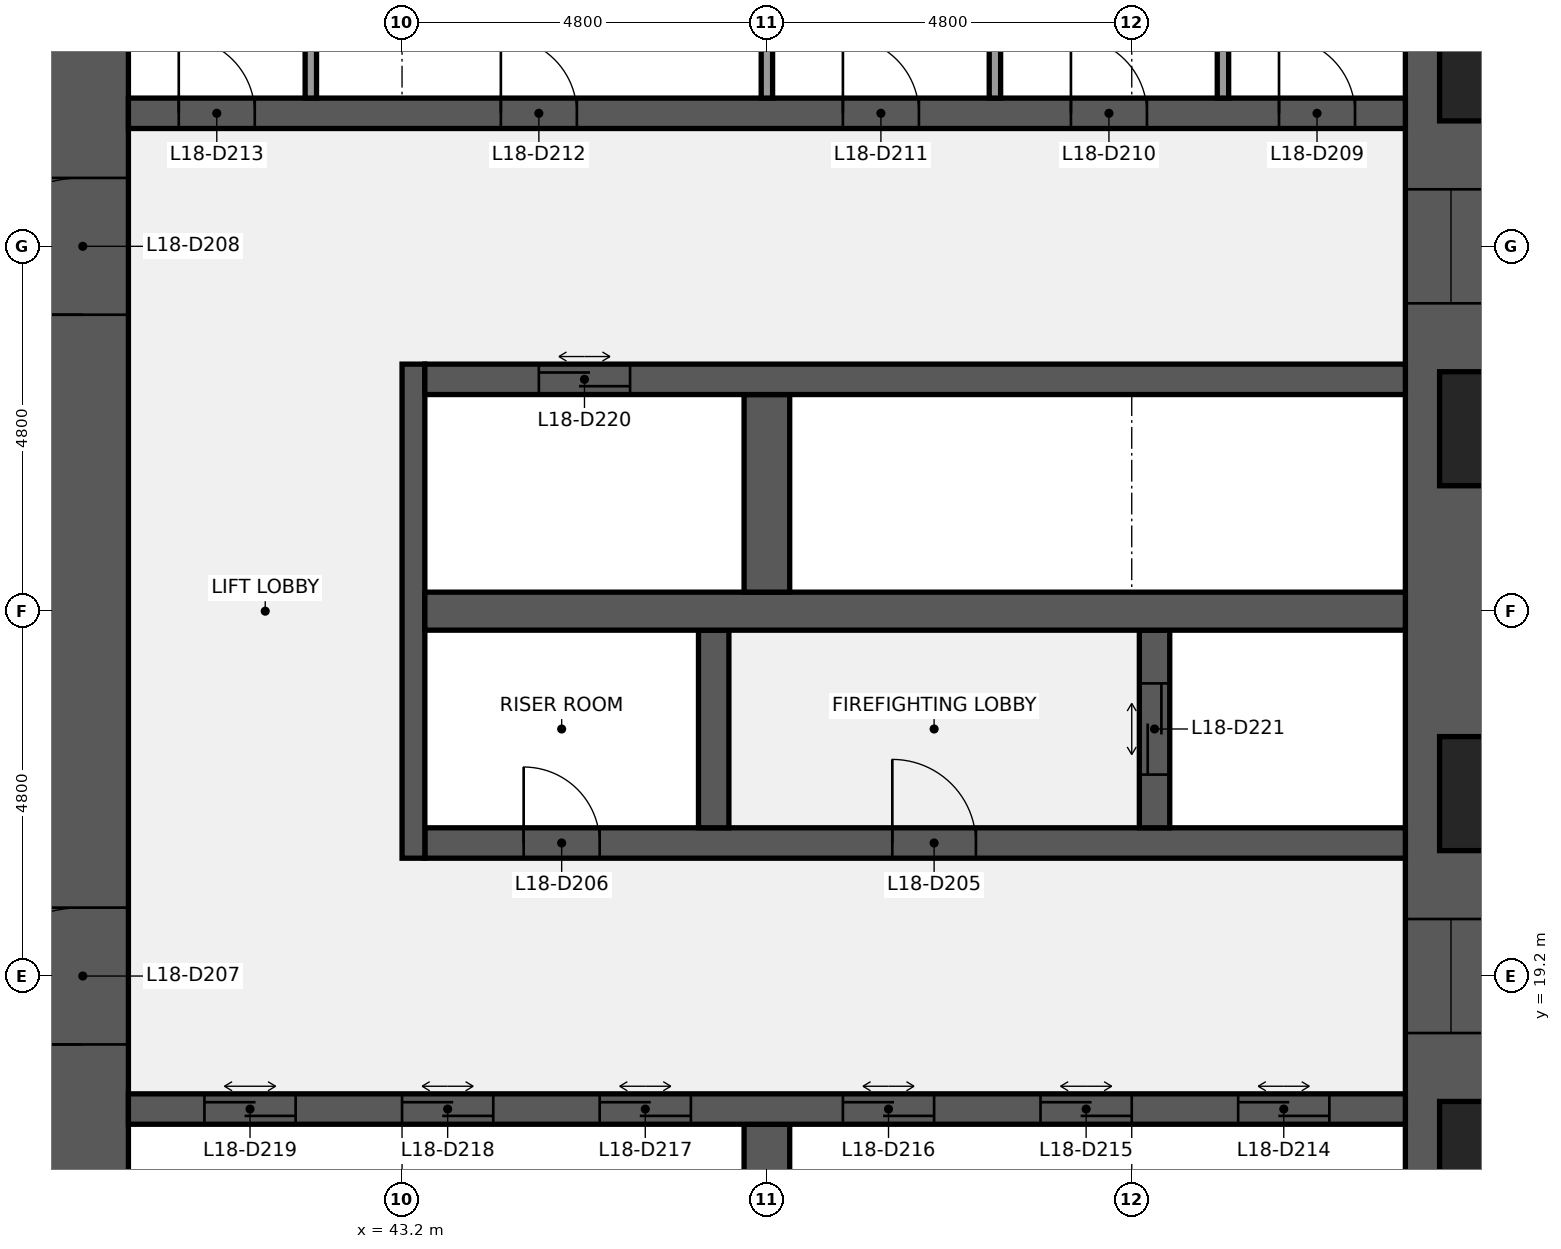
"""IFC4 building model, lengths in metres.
Left out: names, types, materials, properties, quantities, classifications, styles, units other than length and angle.
Written with IfcOpenShell. Run it as: python <this file> out.ifc"""

import sys

from ifc_helpers import new_model, si_unit, direction, frame, frame_2d, origin, place, context, subcontext, project, spatial, rectangle, extrude, element, fill, save


model = new_model("IFC4")
c1 = context("Model", 3, precision=1e-05, world=origin(), true_north=direction((0.0, 1.0)))
c2 = subcontext(c1, "Body", "Model", "MODEL_VIEW")
j1 = project(units=[si_unit("LENGTHUNIT", "METRE"), si_unit("PLANEANGLEUNIT", "RADIAN")], contexts=[c1])
p1 = place(None, origin())
s1 = spatial("IfcSite", under=j1, at=p1, CompositionType="ELEMENT")
p2 = place(p1, origin())
s2 = spatial("IfcBuilding", under=s1, at=p2, CompositionType="ELEMENT")
p3 = place(p2, frame((0.0, 0.0, 83.0)))
s3 = spatial("IfcBuildingStorey", under=s2, at=p3, CompositionType="ELEMENT", Elevation=83.0)
p4 = place(p3, frame((57.0, 38.4, 0.0), z_axis=(0.0, 0.0, 1.0), x_axis=(0.0, -1.0, 0.0)))
e1 = element("IfcWall", 1, at=p4, inside=s3, PredefinedType="SHEAR", context=c2, shape_type="SweptSolid", body=[
    extrude(rectangle(XDim=28.8, YDim=1.2, at=frame_2d((14.4, 0.0))), origin(), (0.0, 0.0, 1.0), 3.7),
])
p5 = place(p4, frame((18.45, 0.0, 0.9)))
e2 = element("IfcOpeningElement", 2, at=p5, cuts=e1, PredefinedType="OPENING", context=c2, shape_type="SweptSolid", body=[
    extrude(rectangle(XDim=1.5, YDim=1.5, at=frame_2d((0.75, 0.75))), frame((0.0, 0.61, 0.0), z_axis=(0.0, -1.0, 0.0), x_axis=(1.0, 0.0, 0.0)), (0.0, 0.0, 1.0), 1.22),
])
p6 = place(p4, frame((8.85, 0.0, 0.9)))
e3 = element("IfcOpeningElement", 3, at=p6, cuts=e1, PredefinedType="OPENING", context=c2, shape_type="SweptSolid", body=[
    extrude(rectangle(XDim=1.5, YDim=1.5, at=frame_2d((0.75, 0.75))), frame((0.0, 0.61, 0.0), z_axis=(0.0, -1.0, 0.0), x_axis=(1.0, 0.0, 0.0)), (0.0, 0.0, 1.0), 1.22),
])
p7 = place(p3, frame((39.0, 9.6, 0.0), z_axis=(0.0, 0.0, 1.0), x_axis=(0.0, 1.0, 0.0)))
e4 = element("IfcWall", 4, at=p7, inside=s3, PredefinedType="SHEAR", context=c2, shape_type="SweptSolid", body=[
    extrude(rectangle(XDim=28.8, YDim=1.2, at=frame_2d((14.4, 0.0))), origin(), (0.0, 0.0, 1.0), 3.7),
])
p8 = place(p7, frame((8.7, 0.0, 0.0)))
e5 = element("IfcOpeningElement", 5, at=p8, cuts=e4, PredefinedType="OPENING", context=c2, shape_type="SweptSolid", body=[
    extrude(rectangle(XDim=1.8, YDim=2.1, at=frame_2d((0.9, 1.05))), frame((0.0, 0.61, 0.0), z_axis=(0.0, -1.0, 0.0), x_axis=(1.0, 0.0, 0.0)), (0.0, 0.0, 1.0), 1.22),
])
p9 = place(p7, frame((18.3, 0.0, 0.0)))
e6 = element("IfcOpeningElement", 6, at=p9, cuts=e4, PredefinedType="OPENING", context=c2, shape_type="SweptSolid", body=[
    extrude(rectangle(XDim=1.8, YDim=2.1, at=frame_2d((0.9, 1.05))), frame((0.0, 0.61, 0.0), z_axis=(0.0, -1.0, 0.0), x_axis=(1.0, 0.0, 0.0)), (0.0, 0.0, 1.0), 1.22),
])
p10 = place(p3, frame((48.0, 14.65, 0.0), z_axis=(0.0, 0.0, 1.0), x_axis=(0.0, 1.0, 0.0)))
e7 = element("IfcWall", 7, at=p10, inside=s3, PredefinedType="SHEAR", context=c2, shape_type="SweptSolid", body=[
    extrude(rectangle(XDim=2.6, YDim=0.6, at=frame_2d((1.3, 0.0))), origin(), (0.0, 0.0, 1.0), 3.7),
])
p11 = place(p3, frame((39.6, 17.45, 0.0), z_axis=(0.0, 0.0, 1.0), x_axis=(1.0, 0.0, 0.0)))
e8 = element("IfcWall", 8, at=p11, inside=s3, PredefinedType="SHEAR", context=c2, shape_type="SweptSolid", body=[
    extrude(rectangle(XDim=16.8, YDim=0.4, at=frame_2d((8.4, 0.0))), origin(), (0.0, 0.0, 1.0), 3.7),
])
p12 = place(p11, frame((14.6, 0.0, 0.0)))
e9 = element("IfcOpeningElement", 9, at=p12, cuts=e8, PredefinedType="OPENING", context=c2, shape_type="SweptSolid", body=[
    extrude(rectangle(XDim=1.2, YDim=2.1, at=frame_2d((0.6, 1.05))), frame((0.0, 0.21, 0.0), z_axis=(0.0, -1.0, 0.0), x_axis=(1.0, 0.0, 0.0)), (0.0, 0.0, 1.0), 0.42),
])
p13 = place(p11, frame((12.0, 0.0, 0.0)))
e10 = element("IfcOpeningElement", 10, at=p13, cuts=e8, PredefinedType="OPENING", context=c2, shape_type="SweptSolid", body=[
    extrude(rectangle(XDim=1.2, YDim=2.1, at=frame_2d((0.6, 1.05))), frame((0.0, 0.21, 0.0), z_axis=(0.0, -1.0, 0.0), x_axis=(1.0, 0.0, 0.0)), (0.0, 0.0, 1.0), 0.42),
])
p14 = place(p11, frame((9.4, 0.0, 0.0)))
e11 = element("IfcOpeningElement", 11, at=p14, cuts=e8, PredefinedType="OPENING", context=c2, shape_type="SweptSolid", body=[
    extrude(rectangle(XDim=1.2, YDim=2.1, at=frame_2d((0.6, 1.05))), frame((0.0, 0.21, 0.0), z_axis=(0.0, -1.0, 0.0), x_axis=(1.0, 0.0, 0.0)), (0.0, 0.0, 1.0), 0.42),
])
p15 = place(p11, frame((6.2, 0.0, 0.0)))
e12 = element("IfcOpeningElement", 12, at=p15, cuts=e8, PredefinedType="OPENING", context=c2, shape_type="SweptSolid", body=[
    extrude(rectangle(XDim=1.2, YDim=2.1, at=frame_2d((0.6, 1.05))), frame((0.0, 0.21, 0.0), z_axis=(0.0, -1.0, 0.0), x_axis=(1.0, 0.0, 0.0)), (0.0, 0.0, 1.0), 0.42),
])
p16 = place(p11, frame((3.6, 0.0, 0.0)))
e13 = element("IfcOpeningElement", 13, at=p16, cuts=e8, PredefinedType="OPENING", context=c2, shape_type="SweptSolid", body=[
    extrude(rectangle(XDim=1.2, YDim=2.1, at=frame_2d((0.6, 1.05))), frame((0.0, 0.21, 0.0), z_axis=(0.0, -1.0, 0.0), x_axis=(1.0, 0.0, 0.0)), (0.0, 0.0, 1.0), 0.42),
])
p17 = place(p11, frame((1.0, 0.0, 0.0)))
e14 = element("IfcOpeningElement", 14, at=p17, cuts=e8, PredefinedType="OPENING", context=c2, shape_type="SweptSolid", body=[
    extrude(rectangle(XDim=1.2, YDim=2.1, at=frame_2d((0.6, 1.05))), frame((0.0, 0.21, 0.0), z_axis=(0.0, -1.0, 0.0), x_axis=(1.0, 0.0, 0.0)), (0.0, 0.0, 1.0), 0.42),
])
p18 = place(p3, frame((43.5, 20.95, 0.0), z_axis=(0.0, 0.0, 1.0), x_axis=(1.0, 0.0, 0.0)))
e15 = element("IfcWall", 15, at=p18, inside=s3, PredefinedType="SHEAR", context=c2, shape_type="SweptSolid", body=[
    extrude(rectangle(XDim=12.9, YDim=0.4, at=frame_2d((6.45, 0.0))), origin(), (0.0, 0.0, 1.0), 3.7),
])
p19 = place(p18, frame((6.15, 0.0, 0.0)))
e16 = element("IfcOpeningElement", 16, at=p19, cuts=e15, PredefinedType="OPENING", context=c2, shape_type="SweptSolid", body=[
    extrude(rectangle(XDim=1.1, YDim=2.1, at=frame_2d((0.55, 1.05))), frame((0.0, 0.21, 0.0), z_axis=(0.0, -1.0, 0.0), x_axis=(1.0, 0.0, 0.0)), (0.0, 0.0, 1.0), 0.42),
])
p20 = place(p18, frame((1.3, 0.0, 0.0)))
e17 = element("IfcOpeningElement", 17, at=p20, cuts=e15, PredefinedType="OPENING", context=c2, shape_type="SweptSolid", body=[
    extrude(rectangle(XDim=1.0, YDim=2.1, at=frame_2d((0.5, 1.05))), frame((0.0, 0.21, 0.0), z_axis=(0.0, -1.0, 0.0), x_axis=(1.0, 0.0, 0.0)), (0.0, 0.0, 1.0), 0.42),
])
p21 = place(p3, frame((43.35, 20.75, 0.0), z_axis=(0.0, 0.0, 1.0), x_axis=(0.0, 1.0, 0.0)))
e18 = element("IfcWall", 18, at=p21, inside=s3, PredefinedType="SHEAR", context=c2, shape_type="SweptSolid", body=[
    extrude(rectangle(XDim=6.5, YDim=0.3, at=frame_2d((3.25, 0.0))), origin(), (0.0, 0.0, 1.0), 3.7),
])
p22 = place(p3, frame((53.1, 21.15, 0.0), z_axis=(0.0, 0.0, 1.0), x_axis=(0.0, 1.0, 0.0)))
e19 = element("IfcWall", 19, at=p22, inside=s3, PredefinedType="SHEAR", context=c2, shape_type="SweptSolid", body=[
    extrude(rectangle(XDim=2.6, YDim=0.4, at=frame_2d((1.3, 0.0))), origin(), (0.0, 0.0, 1.0), 3.7),
])
p23 = place(p22, frame((0.7, 0.0, 0.0)))
e20 = element("IfcOpeningElement", 20, at=p23, cuts=e19, PredefinedType="OPENING", context=c2, shape_type="SweptSolid", body=[
    extrude(rectangle(XDim=1.2, YDim=2.1, at=frame_2d((0.6, 1.05))), frame((0.0, 0.21, 0.0), z_axis=(0.0, -1.0, 0.0), x_axis=(1.0, 0.0, 0.0)), (0.0, 0.0, 1.0), 0.42),
])
p24 = place(p3, frame((47.3, 21.15, 0.0), z_axis=(0.0, 0.0, 1.0), x_axis=(0.0, 1.0, 0.0)))
e21 = element("IfcWall", 21, at=p24, inside=s3, PredefinedType="SHEAR", context=c2, shape_type="SweptSolid", body=[
    extrude(rectangle(XDim=2.6, YDim=0.4, at=frame_2d((1.3, 0.0))), origin(), (0.0, 0.0, 1.0), 3.7),
])
p25 = place(p3, frame((43.5, 24.0, 0.0), z_axis=(0.0, 0.0, 1.0), x_axis=(1.0, 0.0, 0.0)))
e22 = element("IfcWall", 22, at=p25, inside=s3, PredefinedType="SHEAR", context=c2, shape_type="SweptSolid", body=[
    extrude(rectangle(XDim=12.9, YDim=0.5, at=frame_2d((6.45, 0.0))), origin(), (0.0, 0.0, 1.0), 3.7),
])
p26 = place(p3, frame((48.0, 24.25, 0.0), z_axis=(0.0, 0.0, 1.0), x_axis=(0.0, 1.0, 0.0)))
e23 = element("IfcWall", 23, at=p26, inside=s3, PredefinedType="SHEAR", context=c2, shape_type="SweptSolid", body=[
    extrude(rectangle(XDim=2.6, YDim=0.6, at=frame_2d((1.3, 0.0))), origin(), (0.0, 0.0, 1.0), 3.7),
])
p27 = place(p3, frame((43.5, 27.05, 0.0), z_axis=(0.0, 0.0, 1.0), x_axis=(1.0, 0.0, 0.0)))
e24 = element("IfcWall", 24, at=p27, inside=s3, PredefinedType="SHEAR", context=c2, shape_type="SweptSolid", body=[
    extrude(rectangle(XDim=12.9, YDim=0.4, at=frame_2d((6.45, 0.0))), origin(), (0.0, 0.0, 1.0), 3.7),
])
p28 = place(p27, frame((1.5, 0.0, 0.0)))
e25 = element("IfcOpeningElement", 25, at=p28, cuts=e24, PredefinedType="OPENING", context=c2, shape_type="SweptSolid", body=[
    extrude(rectangle(XDim=1.2, YDim=2.1, at=frame_2d((0.6, 1.05))), frame((0.0, 0.21, 0.0), z_axis=(0.0, -1.0, 0.0), x_axis=(1.0, 0.0, 0.0)), (0.0, 0.0, 1.0), 0.42),
])
p29 = place(p3, frame((39.6, 30.55, 0.0), z_axis=(0.0, 0.0, 1.0), x_axis=(1.0, 0.0, 0.0)))
e26 = element("IfcWall", 26, at=p29, inside=s3, PredefinedType="SHEAR", context=c2, shape_type="SweptSolid", body=[
    extrude(rectangle(XDim=16.8, YDim=0.4, at=frame_2d((8.4, 0.0))), origin(), (0.0, 0.0, 1.0), 3.7),
])
p30 = place(p29, frame((15.137, 0.0, 0.0)))
e27 = element("IfcOpeningElement", 27, at=p30, cuts=e26, PredefinedType="OPENING", context=c2, shape_type="SweptSolid", body=[
    extrude(rectangle(XDim=1.0, YDim=2.1, at=frame_2d((0.5, 1.05))), frame((0.0, 0.21, 0.0), z_axis=(0.0, -1.0, 0.0), x_axis=(1.0, 0.0, 0.0)), (0.0, 0.0, 1.0), 0.42),
])
p31 = place(p29, frame((12.4, 0.0, 0.0)))
e28 = element("IfcOpeningElement", 28, at=p31, cuts=e26, PredefinedType="OPENING", context=c2, shape_type="SweptSolid", body=[
    extrude(rectangle(XDim=1.0, YDim=2.1, at=frame_2d((0.5, 1.05))), frame((0.0, 0.21, 0.0), z_axis=(0.0, -1.0, 0.0), x_axis=(1.0, 0.0, 0.0)), (0.0, 0.0, 1.0), 0.42),
])
p32 = place(p29, frame((9.4, 0.0, 0.0)))
e29 = element("IfcOpeningElement", 29, at=p32, cuts=e26, PredefinedType="OPENING", context=c2, shape_type="SweptSolid", body=[
    extrude(rectangle(XDim=1.0, YDim=2.1, at=frame_2d((0.5, 1.05))), frame((0.0, 0.21, 0.0), z_axis=(0.0, -1.0, 0.0), x_axis=(1.0, 0.0, 0.0)), (0.0, 0.0, 1.0), 0.42),
])
p33 = place(p29, frame((4.9, 0.0, 0.0)))
e30 = element("IfcOpeningElement", 30, at=p33, cuts=e26, PredefinedType="OPENING", context=c2, shape_type="SweptSolid", body=[
    extrude(rectangle(XDim=1.0, YDim=2.1, at=frame_2d((0.5, 1.05))), frame((0.0, 0.21, 0.0), z_axis=(0.0, -1.0, 0.0), x_axis=(1.0, 0.0, 0.0)), (0.0, 0.0, 1.0), 0.42),
])
p34 = place(p29, frame((0.663, 0.0, 0.0)))
e31 = element("IfcOpeningElement", 31, at=p34, cuts=e26, PredefinedType="OPENING", context=c2, shape_type="SweptSolid", body=[
    extrude(rectangle(XDim=1.0, YDim=2.1, at=frame_2d((0.5, 1.05))), frame((0.0, 0.21, 0.0), z_axis=(0.0, -1.0, 0.0), x_axis=(1.0, 0.0, 0.0)), (0.0, 0.0, 1.0), 0.42),
])
for number, where, z_axis, x_axis in (
    (32, (54.0, 30.75, 0.0), (0.0, 0.0, 1.0), (0.0, 1.0, 0.0)),
    (33, (51.0, 30.75, 0.0), (0.0, 0.0, 1.0), (0.0, 1.0, 0.0)),
    (34, (48.0, 30.75, 0.0), (0.0, 0.0, 1.0), (0.0, 1.0, 0.0)),
    (35, (42.0, 30.75, 0.0), (0.0, 0.0, 1.0), (0.0, 1.0, 0.0)),
):
    element("IfcWall", number, at=place(p3, frame(where, z_axis=z_axis, x_axis=x_axis)), inside=s3, PredefinedType="PARTITIONING", context=c2, shape_type="SweptSolid", body=[
        extrude(rectangle(XDim=2.6, YDim=0.15, at=frame_2d((1.3, 0.0))), origin(), (0.0, 0.0, 1.0), 3.7),
    ])
p35 = place(p19, origin())
e36 = element("IfcDoor", 36, at=p35, inside=s3, OperationType="SINGLE_SWING_LEFT", PredefinedType="DOOR", context=c2, shape_type="SweptSolid", body=[
    extrude(rectangle(XDim=1.1, YDim=2.1, at=frame_2d((0.55, 1.05))), frame((0.0, 0.025, 0.0), z_axis=(0.0, -1.0, 0.0), x_axis=(1.0, 0.0, 0.0)), (0.0, 0.0, 1.0), 0.05),
])
fill(e16, e36)
p36 = place(p20, origin())
e37 = element("IfcDoor", 37, at=p36, inside=s3, OperationType="SINGLE_SWING_LEFT", PredefinedType="DOOR", context=c2, shape_type="SweptSolid", body=[
    extrude(rectangle(XDim=1.0, YDim=2.1, at=frame_2d((0.5, 1.05))), frame((0.0, 0.025, 0.0), z_axis=(0.0, -1.0, 0.0), x_axis=(1.0, 0.0, 0.0)), (0.0, 0.0, 1.0), 0.05),
])
fill(e17, e37)
p37 = place(p8, origin())
e38 = element("IfcDoor", 38, at=p37, inside=s3, OperationType="DOUBLE_DOOR_SINGLE_SWING", PredefinedType="DOOR", context=c2, shape_type="SweptSolid", body=[
    extrude(rectangle(XDim=1.8, YDim=2.1, at=frame_2d((0.9, 1.05))), frame((0.0, 0.025, 0.0), z_axis=(0.0, -1.0, 0.0), x_axis=(1.0, 0.0, 0.0)), (0.0, 0.0, 1.0), 0.05),
])
fill(e5, e38)
p38 = place(p9, origin())
e39 = element("IfcDoor", 39, at=p38, inside=s3, OperationType="DOUBLE_DOOR_SINGLE_SWING", PredefinedType="DOOR", context=c2, shape_type="SweptSolid", body=[
    extrude(rectangle(XDim=1.8, YDim=2.1, at=frame_2d((0.9, 1.05))), frame((0.0, 0.025, 0.0), z_axis=(0.0, -1.0, 0.0), x_axis=(1.0, 0.0, 0.0)), (0.0, 0.0, 1.0), 0.05),
])
fill(e6, e39)
p39 = place(p30, origin())
e40 = element("IfcDoor", 40, at=p39, inside=s3, OperationType="SINGLE_SWING_LEFT", PredefinedType="DOOR", context=c2, shape_type="SweptSolid", body=[
    extrude(rectangle(XDim=1.0, YDim=2.1, at=frame_2d((0.5, 1.05))), frame((0.0, 0.025, 0.0), z_axis=(0.0, -1.0, 0.0), x_axis=(1.0, 0.0, 0.0)), (0.0, 0.0, 1.0), 0.05),
])
fill(e27, e40)
p40 = place(p31, origin())
e41 = element("IfcDoor", 41, at=p40, inside=s3, OperationType="SINGLE_SWING_LEFT", PredefinedType="DOOR", context=c2, shape_type="SweptSolid", body=[
    extrude(rectangle(XDim=1.0, YDim=2.1, at=frame_2d((0.5, 1.05))), frame((0.0, 0.025, 0.0), z_axis=(0.0, -1.0, 0.0), x_axis=(1.0, 0.0, 0.0)), (0.0, 0.0, 1.0), 0.05),
])
fill(e28, e41)
p41 = place(p32, origin())
e42 = element("IfcDoor", 42, at=p41, inside=s3, OperationType="SINGLE_SWING_LEFT", PredefinedType="DOOR", context=c2, shape_type="SweptSolid", body=[
    extrude(rectangle(XDim=1.0, YDim=2.1, at=frame_2d((0.5, 1.05))), frame((0.0, 0.025, 0.0), z_axis=(0.0, -1.0, 0.0), x_axis=(1.0, 0.0, 0.0)), (0.0, 0.0, 1.0), 0.05),
])
fill(e29, e42)
p42 = place(p33, origin())
e43 = element("IfcDoor", 43, at=p42, inside=s3, OperationType="SINGLE_SWING_LEFT", PredefinedType="DOOR", context=c2, shape_type="SweptSolid", body=[
    extrude(rectangle(XDim=1.0, YDim=2.1, at=frame_2d((0.5, 1.05))), frame((0.0, 0.025, 0.0), z_axis=(0.0, -1.0, 0.0), x_axis=(1.0, 0.0, 0.0)), (0.0, 0.0, 1.0), 0.05),
])
fill(e30, e43)
p43 = place(p34, origin())
e44 = element("IfcDoor", 44, at=p43, inside=s3, OperationType="SINGLE_SWING_LEFT", PredefinedType="DOOR", context=c2, shape_type="SweptSolid", body=[
    extrude(rectangle(XDim=1.0, YDim=2.1, at=frame_2d((0.5, 1.05))), frame((0.0, 0.025, 0.0), z_axis=(0.0, -1.0, 0.0), x_axis=(1.0, 0.0, 0.0)), (0.0, 0.0, 1.0), 0.05),
])
fill(e31, e44)
p44 = place(p12, origin())
e45 = element("IfcDoor", 45, at=p44, inside=s3, OperationType="DOUBLE_DOOR_SLIDING", PredefinedType="DOOR", context=c2, shape_type="SweptSolid", body=[
    extrude(rectangle(XDim=1.2, YDim=2.1, at=frame_2d((0.6, 1.05))), frame((0.0, 0.025, 0.0), z_axis=(0.0, -1.0, 0.0), x_axis=(1.0, 0.0, 0.0)), (0.0, 0.0, 1.0), 0.05),
])
fill(e9, e45)
p45 = place(p13, origin())
e46 = element("IfcDoor", 46, at=p45, inside=s3, OperationType="DOUBLE_DOOR_SLIDING", PredefinedType="DOOR", context=c2, shape_type="SweptSolid", body=[
    extrude(rectangle(XDim=1.2, YDim=2.1, at=frame_2d((0.6, 1.05))), frame((0.0, 0.025, 0.0), z_axis=(0.0, -1.0, 0.0), x_axis=(1.0, 0.0, 0.0)), (0.0, 0.0, 1.0), 0.05),
])
fill(e10, e46)
p46 = place(p14, origin())
e47 = element("IfcDoor", 47, at=p46, inside=s3, OperationType="DOUBLE_DOOR_SLIDING", PredefinedType="DOOR", context=c2, shape_type="SweptSolid", body=[
    extrude(rectangle(XDim=1.2, YDim=2.1, at=frame_2d((0.6, 1.05))), frame((0.0, 0.025, 0.0), z_axis=(0.0, -1.0, 0.0), x_axis=(1.0, 0.0, 0.0)), (0.0, 0.0, 1.0), 0.05),
])
fill(e11, e47)
p47 = place(p15, origin())
e48 = element("IfcDoor", 48, at=p47, inside=s3, OperationType="DOUBLE_DOOR_SLIDING", PredefinedType="DOOR", context=c2, shape_type="SweptSolid", body=[
    extrude(rectangle(XDim=1.2, YDim=2.1, at=frame_2d((0.6, 1.05))), frame((0.0, 0.025, 0.0), z_axis=(0.0, -1.0, 0.0), x_axis=(1.0, 0.0, 0.0)), (0.0, 0.0, 1.0), 0.05),
])
fill(e12, e48)
p48 = place(p16, origin())
e49 = element("IfcDoor", 49, at=p48, inside=s3, OperationType="DOUBLE_DOOR_SLIDING", PredefinedType="DOOR", context=c2, shape_type="SweptSolid", body=[
    extrude(rectangle(XDim=1.2, YDim=2.1, at=frame_2d((0.6, 1.05))), frame((0.0, 0.025, 0.0), z_axis=(0.0, -1.0, 0.0), x_axis=(1.0, 0.0, 0.0)), (0.0, 0.0, 1.0), 0.05),
])
fill(e13, e49)
p49 = place(p17, origin())
e50 = element("IfcDoor", 50, at=p49, inside=s3, OperationType="DOUBLE_DOOR_SLIDING", PredefinedType="DOOR", context=c2, shape_type="SweptSolid", body=[
    extrude(rectangle(XDim=1.2, YDim=2.1, at=frame_2d((0.6, 1.05))), frame((0.0, 0.025, 0.0), z_axis=(0.0, -1.0, 0.0), x_axis=(1.0, 0.0, 0.0)), (0.0, 0.0, 1.0), 0.05),
])
fill(e14, e50)
p50 = place(p28, origin())
e51 = element("IfcDoor", 51, at=p50, inside=s3, OperationType="DOUBLE_DOOR_SLIDING", PredefinedType="DOOR", context=c2, shape_type="SweptSolid", body=[
    extrude(rectangle(XDim=1.2, YDim=2.1, at=frame_2d((0.6, 1.05))), frame((0.0, 0.025, 0.0), z_axis=(0.0, -1.0, 0.0), x_axis=(1.0, 0.0, 0.0)), (0.0, 0.0, 1.0), 0.05),
])
fill(e25, e51)
p51 = place(p23, origin())
e52 = element("IfcDoor", 52, at=p51, inside=s3, OperationType="DOUBLE_DOOR_SLIDING", PredefinedType="DOOR", context=c2, shape_type="SweptSolid", body=[
    extrude(rectangle(XDim=1.2, YDim=2.1, at=frame_2d((0.6, 1.05))), frame((0.0, 0.025, 0.0), z_axis=(0.0, -1.0, 0.0), x_axis=(1.0, 0.0, 0.0)), (0.0, 0.0, 1.0), 0.05),
])
fill(e20, e52)
p52 = place(p5, origin())
e53 = element("IfcWindow", 53, at=p52, inside=s3, PartitioningType="SINGLE_PANEL", PredefinedType="WINDOW", context=c2, shape_type="SweptSolid", body=[
    extrude(rectangle(XDim=1.5, YDim=1.5, at=frame_2d((0.75, 0.75))), frame((0.0, 0.03, 0.0), z_axis=(0.0, -1.0, 0.0), x_axis=(1.0, 0.0, 0.0)), (0.0, 0.0, 1.0), 0.06),
])
fill(e2, e53)
p53 = place(p6, origin())
e54 = element("IfcWindow", 54, at=p53, inside=s3, PartitioningType="SINGLE_PANEL", PredefinedType="WINDOW", context=c2, shape_type="SweptSolid", body=[
    extrude(rectangle(XDim=1.5, YDim=1.5, at=frame_2d((0.75, 0.75))), frame((0.0, 0.03, 0.0), z_axis=(0.0, -1.0, 0.0), x_axis=(1.0, 0.0, 0.0)), (0.0, 0.0, 1.0), 0.06),
])
fill(e3, e54)
save(model, sys.argv[1])
